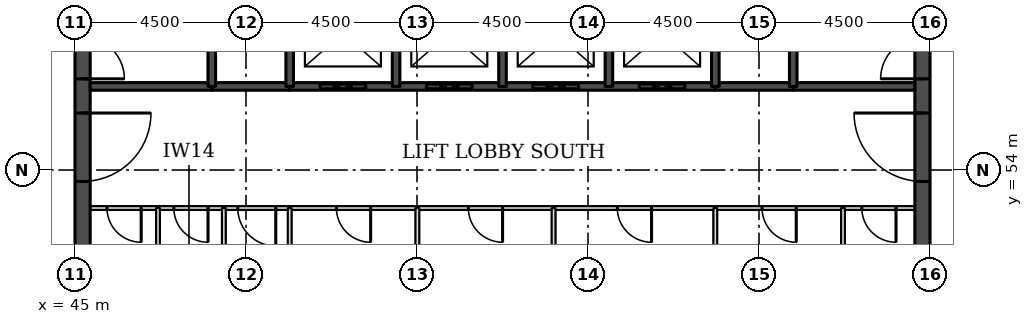
"""IFC4 building model, lengths in metres.
Left out: names, types, materials, properties, quantities, classifications, styles, units other than length and angle.
Written with IfcOpenShell. Run it as: python <this file> out.ifc"""

import sys

from ifc_helpers import new_model, si_unit, direction, frame, frame_2d, origin, place, context, subcontext, project, spatial, rectangle, extrude, element, fill, save


model = new_model("IFC4")
c1 = context("Model", 3, precision=1e-05, world=origin(), true_north=direction((0.0, 1.0)))
c2 = subcontext(c1, "Body", "Model", "MODEL_VIEW")
j1 = project(units=[si_unit("LENGTHUNIT", "METRE"), si_unit("PLANEANGLEUNIT", "RADIAN")], contexts=[c1])
p1 = place(None, origin())
s1 = spatial("IfcSite", under=j1, at=p1, CompositionType="ELEMENT")
p2 = place(p1, origin())
s2 = spatial("IfcBuilding", under=s1, at=p2, CompositionType="ELEMENT")
p3 = place(p2, frame((0.0, 0.0, 211.9)))
s3 = spatial("IfcBuildingStorey", under=s2, at=p3, CompositionType="ELEMENT", Elevation=211.9)
p4 = place(p3, frame((45.2, 49.5, 0.0), z_axis=(0.0, 0.0, 1.0), x_axis=(0.0, 1.0, 0.0)))
e1 = element("IfcWall", 1, at=p4, inside=s3, PredefinedType="SHEAR", context=c2, shape_type="SweptSolid", body=[
    extrude(rectangle(XDim=22.5, YDim=0.4, at=frame_2d((11.25, 0.0))), origin(), (0.0, 0.0, 1.0), 3.7),
])
p5 = place(p4, frame((4.2, 0.0, 0.0)))
e2 = element("IfcOpeningElement", 2, at=p5, cuts=e1, PredefinedType="OPENING", context=c2, shape_type="SweptSolid", body=[
    extrude(rectangle(XDim=1.8, YDim=2.1, at=frame_2d((0.9, 1.05))), frame((0.0, 0.21, 0.0), z_axis=(0.0, -1.0, 0.0), x_axis=(1.0, 0.0, 0.0)), (0.0, 0.0, 1.0), 0.42),
])
p6 = place(p4, frame((6.9, 0.0, 0.0)))
e3 = element("IfcOpeningElement", 3, at=p6, cuts=e1, PredefinedType="OPENING", context=c2, shape_type="SweptSolid", body=[
    extrude(rectangle(XDim=1.1, YDim=2.1, at=frame_2d((0.55, 1.05))), frame((0.0, 0.21, 0.0), z_axis=(0.0, -1.0, 0.0), x_axis=(1.0, 0.0, 0.0)), (0.0, 0.0, 1.0), 0.42),
])
p7 = place(p4, frame((13.6, 0.0, 0.0)))
e4 = element("IfcOpeningElement", 4, at=p7, cuts=e1, PredefinedType="OPENING", context=c2, shape_type="SweptSolid", body=[
    extrude(rectangle(XDim=1.1, YDim=2.1, at=frame_2d((0.55, 1.05))), frame((0.0, 0.21, 0.0), z_axis=(0.0, -1.0, 0.0), x_axis=(1.0, 0.0, 0.0)), (0.0, 0.0, 1.0), 0.42),
])
p8 = place(p4, frame((16.5, 0.0, 0.0)))
e5 = element("IfcOpeningElement", 5, at=p8, cuts=e1, PredefinedType="OPENING", context=c2, shape_type="SweptSolid", body=[
    extrude(rectangle(XDim=1.8, YDim=2.1, at=frame_2d((0.9, 1.05))), frame((0.0, 0.21, 0.0), z_axis=(0.0, -1.0, 0.0), x_axis=(1.0, 0.0, 0.0)), (0.0, 0.0, 1.0), 0.42),
])
p9 = place(p3, frame((67.3, 49.5, 0.0), z_axis=(0.0, 0.0, 1.0), x_axis=(0.0, 1.0, 0.0)))
e6 = element("IfcWall", 6, at=p9, inside=s3, PredefinedType="SHEAR", context=c2, shape_type="SweptSolid", body=[
    extrude(rectangle(XDim=22.5, YDim=0.4, at=frame_2d((11.25, 0.0))), origin(), (0.0, 0.0, 1.0), 3.7),
])
p10 = place(p9, frame((4.2, 0.0, 0.0)))
e7 = element("IfcOpeningElement", 7, at=p10, cuts=e6, PredefinedType="OPENING", context=c2, shape_type="SweptSolid", body=[
    extrude(rectangle(XDim=1.8, YDim=2.1, at=frame_2d((0.9, 1.05))), frame((0.0, 0.21, 0.0), z_axis=(0.0, -1.0, 0.0), x_axis=(1.0, 0.0, 0.0)), (0.0, 0.0, 1.0), 0.42),
])
p11 = place(p9, frame((6.9, 0.0, 0.0)))
e8 = element("IfcOpeningElement", 8, at=p11, cuts=e6, PredefinedType="OPENING", context=c2, shape_type="SweptSolid", body=[
    extrude(rectangle(XDim=1.1, YDim=2.1, at=frame_2d((0.55, 1.05))), frame((0.0, 0.21, 0.0), z_axis=(0.0, -1.0, 0.0), x_axis=(1.0, 0.0, 0.0)), (0.0, 0.0, 1.0), 0.42),
])
p12 = place(p9, frame((13.6, 0.0, 0.0)))
e9 = element("IfcOpeningElement", 9, at=p12, cuts=e6, PredefinedType="OPENING", context=c2, shape_type="SweptSolid", body=[
    extrude(rectangle(XDim=1.1, YDim=2.1, at=frame_2d((0.55, 1.05))), frame((0.0, 0.21, 0.0), z_axis=(0.0, -1.0, 0.0), x_axis=(1.0, 0.0, 0.0)), (0.0, 0.0, 1.0), 0.42),
])
p13 = place(p9, frame((16.5, 0.0, 0.0)))
e10 = element("IfcOpeningElement", 10, at=p13, cuts=e6, PredefinedType="OPENING", context=c2, shape_type="SweptSolid", body=[
    extrude(rectangle(XDim=1.8, YDim=2.1, at=frame_2d((0.9, 1.05))), frame((0.0, 0.21, 0.0), z_axis=(0.0, -1.0, 0.0), x_axis=(1.0, 0.0, 0.0)), (0.0, 0.0, 1.0), 0.42),
])
p14 = place(p3, frame((45.4, 53.0, 0.0), z_axis=(0.0, 0.0, 1.0), x_axis=(1.0, 0.0, 0.0)))
e11 = element("IfcWall", 11, at=p14, inside=s3, PredefinedType="PARTITIONING", context=c2, shape_type="SweptSolid", body=[
    extrude(rectangle(XDim=21.7, YDim=0.1, at=frame_2d((10.85, 0.0))), origin(), (0.0, 0.0, 1.0), 3.55),
])
p15 = place(p14, frame((20.305, 0.0, 0.0)))
e12 = element("IfcOpeningElement", 12, at=p15, cuts=e11, PredefinedType="OPENING", context=c2, shape_type="SweptSolid", body=[
    extrude(rectangle(XDim=0.9, YDim=2.1, at=frame_2d((0.45, 1.05))), frame((0.0, 0.06, 0.0), z_axis=(0.0, -1.0, 0.0), x_axis=(1.0, 0.0, 0.0)), (0.0, 0.0, 1.0), 0.12),
])
p16 = place(p14, frame((17.68, 0.0, 0.0)))
e13 = element("IfcOpeningElement", 13, at=p16, cuts=e11, PredefinedType="OPENING", context=c2, shape_type="SweptSolid", body=[
    extrude(rectangle(XDim=0.9, YDim=2.1, at=frame_2d((0.45, 1.05))), frame((0.0, 0.06, 0.0), z_axis=(0.0, -1.0, 0.0), x_axis=(1.0, 0.0, 0.0)), (0.0, 0.0, 1.0), 0.12),
])
p17 = place(p14, frame((0.442, 0.0, 0.0)))
e14 = element("IfcOpeningElement", 14, at=p17, cuts=e11, PredefinedType="OPENING", context=c2, shape_type="SweptSolid", body=[
    extrude(rectangle(XDim=0.9, YDim=2.1, at=frame_2d((0.45, 1.05))), frame((0.0, 0.06, 0.0), z_axis=(0.0, -1.0, 0.0), x_axis=(1.0, 0.0, 0.0)), (0.0, 0.0, 1.0), 0.12),
])
p18 = place(p14, frame((2.201, 0.0, 0.0)))
e15 = element("IfcOpeningElement", 15, at=p18, cuts=e11, PredefinedType="OPENING", context=c2, shape_type="SweptSolid", body=[
    extrude(rectangle(XDim=0.9, YDim=2.1, at=frame_2d((0.45, 1.05))), frame((0.0, 0.06, 0.0), z_axis=(0.0, -1.0, 0.0), x_axis=(1.0, 0.0, 0.0)), (0.0, 0.0, 1.0), 0.12),
])
p19 = place(p14, frame((3.884, 0.0, 0.0)))
e16 = element("IfcOpeningElement", 16, at=p19, cuts=e11, PredefinedType="OPENING", context=c2, shape_type="SweptSolid", body=[
    extrude(rectangle(XDim=1.0, YDim=2.1, at=frame_2d((0.5, 1.05))), frame((0.0, 0.06, 0.0), z_axis=(0.0, -1.0, 0.0), x_axis=(1.0, 0.0, 0.0)), (0.0, 0.0, 1.0), 0.12),
])
p20 = place(p14, frame((6.48, 0.0, 0.0)))
e17 = element("IfcOpeningElement", 17, at=p20, cuts=e11, PredefinedType="OPENING", context=c2, shape_type="SweptSolid", body=[
    extrude(rectangle(XDim=0.9, YDim=2.1, at=frame_2d((0.45, 1.05))), frame((0.0, 0.06, 0.0), z_axis=(0.0, -1.0, 0.0), x_axis=(1.0, 0.0, 0.0)), (0.0, 0.0, 1.0), 0.12),
])
p21 = place(p14, frame((9.952, 0.0, 0.0)))
e18 = element("IfcOpeningElement", 18, at=p21, cuts=e11, PredefinedType="OPENING", context=c2, shape_type="SweptSolid", body=[
    extrude(rectangle(XDim=0.9, YDim=2.1, at=frame_2d((0.45, 1.05))), frame((0.0, 0.06, 0.0), z_axis=(0.0, -1.0, 0.0), x_axis=(1.0, 0.0, 0.0)), (0.0, 0.0, 1.0), 0.12),
])
p22 = place(p14, frame((13.872, 0.0, 0.0)))
e19 = element("IfcOpeningElement", 19, at=p22, cuts=e11, PredefinedType="OPENING", context=c2, shape_type="SweptSolid", body=[
    extrude(rectangle(XDim=0.9, YDim=2.1, at=frame_2d((0.45, 1.05))), frame((0.0, 0.06, 0.0), z_axis=(0.0, -1.0, 0.0), x_axis=(1.0, 0.0, 0.0)), (0.0, 0.0, 1.0), 0.12),
])
for number, where, z_axis, x_axis in (
    (20, (48.6, 56.2, 0.0), (0.0, 0.0, 1.0), (1.0, 0.0, 0.0)),
    (21, (61.85, 56.2, 0.0), (0.0, 0.0, 1.0), (1.0, 0.0, 0.0)),
):
    element("IfcWall", number, at=place(p3, frame(where, z_axis=z_axis, x_axis=x_axis)), inside=s3, PredefinedType="SOLIDWALL", context=c2, shape_type="SweptSolid", body=[
        extrude(rectangle(XDim=2.05, YDim=0.2, at=frame_2d((1.025, 0.0))), origin(), (0.0, 0.0, 1.0), 3.55),
    ])
p23 = place(p3, frame((45.4, 56.2, 0.0), z_axis=(0.0, 0.0, 1.0), x_axis=(1.0, 0.0, 0.0)))
e22 = element("IfcWall", 22, at=p23, inside=s3, PredefinedType="SOLIDWALL", context=c2, shape_type="SweptSolid", body=[
    extrude(rectangle(XDim=3.2, YDim=0.2, at=frame_2d((1.6, 0.0))), origin(), (0.0, 0.0, 1.0), 3.55),
])
p24 = place(p3, frame((50.65, 56.2, 0.0), z_axis=(0.0, 0.0, 1.0), x_axis=(1.0, 0.0, 0.0)))
e23 = element("IfcWall", 23, at=p24, inside=s3, PredefinedType="SOLIDWALL", context=c2, shape_type="SweptSolid", body=[
    extrude(rectangle(XDim=11.2, YDim=0.2, at=frame_2d((5.6, 0.0))), origin(), (0.0, 0.0, 1.0), 3.55),
])
p25 = place(p24, frame((0.8, 0.0, 0.0)))
e24 = element("IfcOpeningElement", 24, at=p25, cuts=e23, PredefinedType="OPENING", context=c2, shape_type="SweptSolid", body=[
    extrude(rectangle(XDim=1.2, YDim=2.1, at=frame_2d((0.6, 1.05))), frame((0.0, 0.11, 0.0), z_axis=(0.0, -1.0, 0.0), x_axis=(1.0, 0.0, 0.0)), (0.0, 0.0, 1.0), 0.22),
])
p26 = place(p24, frame((3.6, 0.0, 0.0)))
e25 = element("IfcOpeningElement", 25, at=p26, cuts=e23, PredefinedType="OPENING", context=c2, shape_type="SweptSolid", body=[
    extrude(rectangle(XDim=1.2, YDim=2.1, at=frame_2d((0.6, 1.05))), frame((0.0, 0.11, 0.0), z_axis=(0.0, -1.0, 0.0), x_axis=(1.0, 0.0, 0.0)), (0.0, 0.0, 1.0), 0.22),
])
p27 = place(p24, frame((6.4, 0.0, 0.0)))
e26 = element("IfcOpeningElement", 26, at=p27, cuts=e23, PredefinedType="OPENING", context=c2, shape_type="SweptSolid", body=[
    extrude(rectangle(XDim=1.2, YDim=2.1, at=frame_2d((0.6, 1.05))), frame((0.0, 0.11, 0.0), z_axis=(0.0, -1.0, 0.0), x_axis=(1.0, 0.0, 0.0)), (0.0, 0.0, 1.0), 0.22),
])
p28 = place(p24, frame((9.2, 0.0, 0.0)))
e27 = element("IfcOpeningElement", 27, at=p28, cuts=e23, PredefinedType="OPENING", context=c2, shape_type="SweptSolid", body=[
    extrude(rectangle(XDim=1.2, YDim=2.1, at=frame_2d((0.6, 1.05))), frame((0.0, 0.11, 0.0), z_axis=(0.0, -1.0, 0.0), x_axis=(1.0, 0.0, 0.0)), (0.0, 0.0, 1.0), 0.22),
])
p29 = place(p3, frame((63.9, 56.2, 0.0), z_axis=(0.0, 0.0, 1.0), x_axis=(1.0, 0.0, 0.0)))
e28 = element("IfcWall", 28, at=p29, inside=s3, PredefinedType="SOLIDWALL", context=c2, shape_type="SweptSolid", body=[
    extrude(rectangle(XDim=3.2, YDim=0.2, at=frame_2d((1.6, 0.0))), origin(), (0.0, 0.0, 1.0), 3.55),
])
p30 = place(p3, frame((47.185, 49.9, 0.0), z_axis=(0.0, 0.0, 1.0), x_axis=(0.0, 1.0, 0.0)))
e29 = element("IfcWall", 29, at=p30, inside=s3, PredefinedType="PARTITIONING", context=c2, shape_type="SweptSolid", body=[
    extrude(rectangle(XDim=3.1, YDim=0.1, at=frame_2d((1.55, 0.0))), origin(), (0.0, 0.0, 1.0), 3.55),
])
p31 = place(p3, frame((48.6, 56.2, 0.0), z_axis=(0.0, 0.0, 1.0), x_axis=(0.0, 1.0, 0.0)))
e30 = element("IfcWall", 30, at=p31, inside=s3, PredefinedType="SOLIDWALL", context=c2, shape_type="SweptSolid", body=[
    extrude(rectangle(XDim=5.8, YDim=0.2, at=frame_2d((2.9, 0.0))), origin(), (0.0, 0.0, 1.0), 3.55),
])
for number, where, z_axis, x_axis in (
    (31, (48.917, 49.9, 0.0), (0.0, 0.0, 1.0), (0.0, 1.0, 0.0)),
    (32, (50.65, 49.9, 0.0), (0.0, 0.0, 1.0), (0.0, 1.0, 0.0)),
):
    element("IfcWall", number, at=place(p3, frame(where, z_axis=z_axis, x_axis=x_axis)), inside=s3, PredefinedType="PARTITIONING", context=c2, shape_type="SweptSolid", body=[
        extrude(rectangle(XDim=3.1, YDim=0.1, at=frame_2d((1.55, 0.0))), origin(), (0.0, 0.0, 1.0), 3.55),
    ])
for number, where, z_axis, x_axis in (
    (33, (50.65, 56.2, 0.0), (0.0, 0.0, 1.0), (0.0, 1.0, 0.0)),
    (34, (53.45, 56.2, 0.0), (0.0, 0.0, 1.0), (0.0, 1.0, 0.0)),
):
    element("IfcWall", number, at=place(p3, frame(where, z_axis=z_axis, x_axis=x_axis)), inside=s3, PredefinedType="SOLIDWALL", context=c2, shape_type="SweptSolid", body=[
        extrude(rectangle(XDim=2.8, YDim=0.2, at=frame_2d((1.4, 0.0))), origin(), (0.0, 0.0, 1.0), 3.55),
    ])
p32 = place(p3, frame((54.01, 49.9, 0.0), z_axis=(0.0, 0.0, 1.0), x_axis=(0.0, 1.0, 0.0)))
e35 = element("IfcWall", 35, at=p32, inside=s3, PredefinedType="PARTITIONING", context=c2, shape_type="SweptSolid", body=[
    extrude(rectangle(XDim=3.1, YDim=0.1, at=frame_2d((1.55, 0.0))), origin(), (0.0, 0.0, 1.0), 3.55),
])
p33 = place(p3, frame((56.25, 56.2, 0.0), z_axis=(0.0, 0.0, 1.0), x_axis=(0.0, 1.0, 0.0)))
e36 = element("IfcWall", 36, at=p33, inside=s3, PredefinedType="SOLIDWALL", context=c2, shape_type="SweptSolid", body=[
    extrude(rectangle(XDim=2.8, YDim=0.2, at=frame_2d((1.4, 0.0))), origin(), (0.0, 0.0, 1.0), 3.55),
])
p34 = place(p3, frame((57.594, 49.9, 0.0), z_axis=(0.0, 0.0, 1.0), x_axis=(0.0, 1.0, 0.0)))
e37 = element("IfcWall", 37, at=p34, inside=s3, PredefinedType="PARTITIONING", context=c2, shape_type="SweptSolid", body=[
    extrude(rectangle(XDim=3.1, YDim=0.1, at=frame_2d((1.55, 0.0))), origin(), (0.0, 0.0, 1.0), 3.55),
])
p35 = place(p3, frame((59.05, 56.2, 0.0), z_axis=(0.0, 0.0, 1.0), x_axis=(0.0, 1.0, 0.0)))
e38 = element("IfcWall", 38, at=p35, inside=s3, PredefinedType="SOLIDWALL", context=c2, shape_type="SweptSolid", body=[
    extrude(rectangle(XDim=2.8, YDim=0.2, at=frame_2d((1.4, 0.0))), origin(), (0.0, 0.0, 1.0), 3.55),
])
p36 = place(p3, frame((61.85, 49.9, 0.0), z_axis=(0.0, 0.0, 1.0), x_axis=(0.0, 1.0, 0.0)))
e39 = element("IfcWall", 39, at=p36, inside=s3, PredefinedType="PARTITIONING", context=c2, shape_type="SweptSolid", body=[
    extrude(rectangle(XDim=3.1, YDim=0.1, at=frame_2d((1.55, 0.0))), origin(), (0.0, 0.0, 1.0), 3.55),
])
p37 = place(p3, frame((61.85, 56.2, 0.0), z_axis=(0.0, 0.0, 1.0), x_axis=(0.0, 1.0, 0.0)))
e40 = element("IfcWall", 40, at=p37, inside=s3, PredefinedType="SOLIDWALL", context=c2, shape_type="SweptSolid", body=[
    extrude(rectangle(XDim=2.8, YDim=0.2, at=frame_2d((1.4, 0.0))), origin(), (0.0, 0.0, 1.0), 3.55),
])
p38 = place(p3, frame((63.9, 56.2, 0.0), z_axis=(0.0, 0.0, 1.0), x_axis=(0.0, 1.0, 0.0)))
e41 = element("IfcWall", 41, at=p38, inside=s3, PredefinedType="SOLIDWALL", context=c2, shape_type="SweptSolid", body=[
    extrude(rectangle(XDim=5.8, YDim=0.2, at=frame_2d((2.9, 0.0))), origin(), (0.0, 0.0, 1.0), 3.55),
])
p39 = place(p3, frame((65.21, 49.9, 0.0), z_axis=(0.0, 0.0, 1.0), x_axis=(0.0, 1.0, 0.0)))
e42 = element("IfcWall", 42, at=p39, inside=s3, PredefinedType="PARTITIONING", context=c2, shape_type="SweptSolid", body=[
    extrude(rectangle(XDim=3.1, YDim=0.1, at=frame_2d((1.55, 0.0))), origin(), (0.0, 0.0, 1.0), 3.55),
])
p40 = place(p25, origin())
e43 = element("IfcDoor", 43, at=p40, inside=s3, OperationType="DOUBLE_DOOR_SLIDING", PredefinedType="DOOR", context=c2, shape_type="SweptSolid", body=[
    extrude(rectangle(XDim=1.2, YDim=2.1, at=frame_2d((0.6, 1.05))), frame((0.0, 0.025, 0.0), z_axis=(0.0, -1.0, 0.0), x_axis=(1.0, 0.0, 0.0)), (0.0, 0.0, 1.0), 0.05),
])
fill(e24, e43)
p41 = place(p26, origin())
e44 = element("IfcDoor", 44, at=p41, inside=s3, OperationType="DOUBLE_DOOR_SLIDING", PredefinedType="DOOR", context=c2, shape_type="SweptSolid", body=[
    extrude(rectangle(XDim=1.2, YDim=2.1, at=frame_2d((0.6, 1.05))), frame((0.0, 0.025, 0.0), z_axis=(0.0, -1.0, 0.0), x_axis=(1.0, 0.0, 0.0)), (0.0, 0.0, 1.0), 0.05),
])
fill(e25, e44)
p42 = place(p27, origin())
e45 = element("IfcDoor", 45, at=p42, inside=s3, OperationType="DOUBLE_DOOR_SLIDING", PredefinedType="DOOR", context=c2, shape_type="SweptSolid", body=[
    extrude(rectangle(XDim=1.2, YDim=2.1, at=frame_2d((0.6, 1.05))), frame((0.0, 0.025, 0.0), z_axis=(0.0, -1.0, 0.0), x_axis=(1.0, 0.0, 0.0)), (0.0, 0.0, 1.0), 0.05),
])
fill(e26, e45)
p43 = place(p28, origin())
e46 = element("IfcDoor", 46, at=p43, inside=s3, OperationType="DOUBLE_DOOR_SLIDING", PredefinedType="DOOR", context=c2, shape_type="SweptSolid", body=[
    extrude(rectangle(XDim=1.2, YDim=2.1, at=frame_2d((0.6, 1.05))), frame((0.0, 0.025, 0.0), z_axis=(0.0, -1.0, 0.0), x_axis=(1.0, 0.0, 0.0)), (0.0, 0.0, 1.0), 0.05),
])
fill(e27, e46)
p44 = place(p5, frame((1.8, 0.0, 0.0), z_axis=(0.0, 0.0, 1.0), x_axis=(-1.0, 0.0, 0.0)))
e47 = element("IfcDoor", 47, at=p44, inside=s3, OperationType="SINGLE_SWING_LEFT", PredefinedType="DOOR", context=c2, shape_type="SweptSolid", body=[
    extrude(rectangle(XDim=1.8, YDim=2.1, at=frame_2d((0.9, 1.05))), frame((0.0, 0.025, 0.0), z_axis=(0.0, -1.0, 0.0), x_axis=(1.0, 0.0, 0.0)), (0.0, 0.0, 1.0), 0.05),
])
fill(e2, e47)
p45 = place(p6, frame((1.1, 0.0, 0.0), z_axis=(0.0, 0.0, 1.0), x_axis=(-1.0, 0.0, 0.0)))
e48 = element("IfcDoor", 48, at=p45, inside=s3, OperationType="SINGLE_SWING_RIGHT", PredefinedType="DOOR", context=c2, shape_type="SweptSolid", body=[
    extrude(rectangle(XDim=1.1, YDim=2.1, at=frame_2d((0.55, 1.05))), frame((0.0, 0.025, 0.0), z_axis=(0.0, -1.0, 0.0), x_axis=(1.0, 0.0, 0.0)), (0.0, 0.0, 1.0), 0.05),
])
fill(e3, e48)
p46 = place(p10, origin())
e49 = element("IfcDoor", 49, at=p46, inside=s3, OperationType="SINGLE_SWING_RIGHT", PredefinedType="DOOR", context=c2, shape_type="SweptSolid", body=[
    extrude(rectangle(XDim=1.8, YDim=2.1, at=frame_2d((0.9, 1.05))), frame((0.0, 0.025, 0.0), z_axis=(0.0, -1.0, 0.0), x_axis=(1.0, 0.0, 0.0)), (0.0, 0.0, 1.0), 0.05),
])
fill(e7, e49)
p47 = place(p11, origin())
e50 = element("IfcDoor", 50, at=p47, inside=s3, OperationType="SINGLE_SWING_LEFT", PredefinedType="DOOR", context=c2, shape_type="SweptSolid", body=[
    extrude(rectangle(XDim=1.1, YDim=2.1, at=frame_2d((0.55, 1.05))), frame((0.0, 0.025, 0.0), z_axis=(0.0, -1.0, 0.0), x_axis=(1.0, 0.0, 0.0)), (0.0, 0.0, 1.0), 0.05),
])
fill(e8, e50)
p48 = place(p15, frame((0.9, 0.0, 0.0), z_axis=(0.0, 0.0, 1.0), x_axis=(-1.0, 0.0, 0.0)))
e51 = element("IfcDoor", 51, at=p48, inside=s3, OperationType="SINGLE_SWING_LEFT", PredefinedType="DOOR", context=c2, shape_type="SweptSolid", body=[
    extrude(rectangle(XDim=0.9, YDim=2.1, at=frame_2d((0.45, 1.05))), frame((0.0, 0.025, 0.0), z_axis=(0.0, -1.0, 0.0), x_axis=(1.0, 0.0, 0.0)), (0.0, 0.0, 1.0), 0.05),
])
fill(e12, e51)
p49 = place(p16, frame((0.9, 0.0, 0.0), z_axis=(0.0, 0.0, 1.0), x_axis=(-1.0, 0.0, 0.0)))
e52 = element("IfcDoor", 52, at=p49, inside=s3, OperationType="SINGLE_SWING_LEFT", PredefinedType="DOOR", context=c2, shape_type="SweptSolid", body=[
    extrude(rectangle(XDim=0.9, YDim=2.1, at=frame_2d((0.45, 1.05))), frame((0.0, 0.025, 0.0), z_axis=(0.0, -1.0, 0.0), x_axis=(1.0, 0.0, 0.0)), (0.0, 0.0, 1.0), 0.05),
])
fill(e13, e52)
p50 = place(p17, frame((0.9, 0.0, 0.0), z_axis=(0.0, 0.0, 1.0), x_axis=(-1.0, 0.0, 0.0)))
e53 = element("IfcDoor", 53, at=p50, inside=s3, OperationType="SINGLE_SWING_LEFT", PredefinedType="DOOR", context=c2, shape_type="SweptSolid", body=[
    extrude(rectangle(XDim=0.9, YDim=2.1, at=frame_2d((0.45, 1.05))), frame((0.0, 0.025, 0.0), z_axis=(0.0, -1.0, 0.0), x_axis=(1.0, 0.0, 0.0)), (0.0, 0.0, 1.0), 0.05),
])
fill(e14, e53)
p51 = place(p18, frame((0.9, 0.0, 0.0), z_axis=(0.0, 0.0, 1.0), x_axis=(-1.0, 0.0, 0.0)))
e54 = element("IfcDoor", 54, at=p51, inside=s3, OperationType="SINGLE_SWING_LEFT", PredefinedType="DOOR", context=c2, shape_type="SweptSolid", body=[
    extrude(rectangle(XDim=0.9, YDim=2.1, at=frame_2d((0.45, 1.05))), frame((0.0, 0.025, 0.0), z_axis=(0.0, -1.0, 0.0), x_axis=(1.0, 0.0, 0.0)), (0.0, 0.0, 1.0), 0.05),
])
fill(e15, e54)
p52 = place(p19, frame((1.0, 0.0, 0.0), z_axis=(0.0, 0.0, 1.0), x_axis=(-1.0, 0.0, 0.0)))
e55 = element("IfcDoor", 55, at=p52, inside=s3, OperationType="SINGLE_SWING_LEFT", PredefinedType="DOOR", context=c2, shape_type="SweptSolid", body=[
    extrude(rectangle(XDim=1.0, YDim=2.1, at=frame_2d((0.5, 1.05))), frame((0.0, 0.025, 0.0), z_axis=(0.0, -1.0, 0.0), x_axis=(1.0, 0.0, 0.0)), (0.0, 0.0, 1.0), 0.05),
])
fill(e16, e55)
p53 = place(p20, frame((0.9, 0.0, 0.0), z_axis=(0.0, 0.0, 1.0), x_axis=(-1.0, 0.0, 0.0)))
e56 = element("IfcDoor", 56, at=p53, inside=s3, OperationType="SINGLE_SWING_LEFT", PredefinedType="DOOR", context=c2, shape_type="SweptSolid", body=[
    extrude(rectangle(XDim=0.9, YDim=2.1, at=frame_2d((0.45, 1.05))), frame((0.0, 0.025, 0.0), z_axis=(0.0, -1.0, 0.0), x_axis=(1.0, 0.0, 0.0)), (0.0, 0.0, 1.0), 0.05),
])
fill(e17, e56)
p54 = place(p21, frame((0.9, 0.0, 0.0), z_axis=(0.0, 0.0, 1.0), x_axis=(-1.0, 0.0, 0.0)))
e57 = element("IfcDoor", 57, at=p54, inside=s3, OperationType="SINGLE_SWING_LEFT", PredefinedType="DOOR", context=c2, shape_type="SweptSolid", body=[
    extrude(rectangle(XDim=0.9, YDim=2.1, at=frame_2d((0.45, 1.05))), frame((0.0, 0.025, 0.0), z_axis=(0.0, -1.0, 0.0), x_axis=(1.0, 0.0, 0.0)), (0.0, 0.0, 1.0), 0.05),
])
fill(e18, e57)
p55 = place(p22, frame((0.9, 0.0, 0.0), z_axis=(0.0, 0.0, 1.0), x_axis=(-1.0, 0.0, 0.0)))
e58 = element("IfcDoor", 58, at=p55, inside=s3, OperationType="SINGLE_SWING_LEFT", PredefinedType="DOOR", context=c2, shape_type="SweptSolid", body=[
    extrude(rectangle(XDim=0.9, YDim=2.1, at=frame_2d((0.45, 1.05))), frame((0.0, 0.025, 0.0), z_axis=(0.0, -1.0, 0.0), x_axis=(1.0, 0.0, 0.0)), (0.0, 0.0, 1.0), 0.05),
])
fill(e19, e58)
save(model, sys.argv[1])
